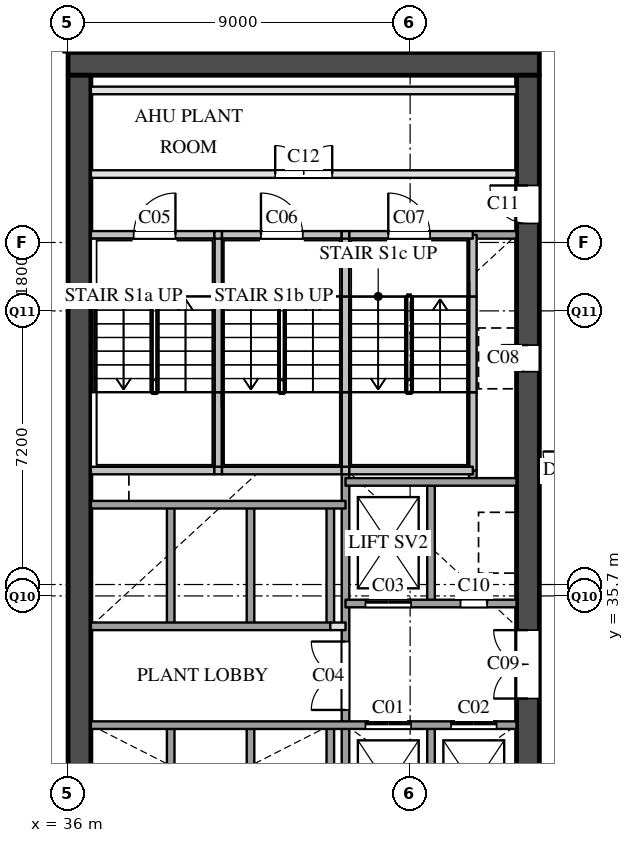
"""IFC4 building model, lengths in metres.
Left out: names, types, materials, properties, quantities, classifications, styles, units other than length and angle.
Written with IfcOpenShell. Run it as: python <this file> out.ifc"""

import sys

from ifc_helpers import new_model, si_unit, direction, frame, frame_2d, origin, place, context, subcontext, project, spatial, rectangle, extrude, element, fill, save


model = new_model("IFC4")
c1 = context("Model", 3, precision=1e-05, world=origin(), true_north=direction((0.0, 1.0)))
c2 = subcontext(c1, "Body", "Model", "MODEL_VIEW")
j1 = project(units=[si_unit("LENGTHUNIT", "METRE"), si_unit("PLANEANGLEUNIT", "RADIAN")], contexts=[c1])
p1 = place(None, origin())
s1 = spatial("IfcSite", under=j1, at=p1, CompositionType="ELEMENT")
p2 = place(p1, origin())
s2 = spatial("IfcBuilding", under=s1, at=p2, CompositionType="ELEMENT")
p3 = place(p2, frame((0.0, 0.0, 26.0)))
s3 = spatial("IfcBuildingStorey", under=s2, at=p3, CompositionType="ELEMENT", Elevation=26.0)
p4 = place(p3, frame((36.0, 49.7, 0.0), z_axis=(0.0, 0.0, 1.0), x_axis=(1.0, 0.0, 0.0)))
e1 = element("IfcWall", 1, at=p4, inside=s3, PredefinedType="SHEAR", context=c2, shape_type="SweptSolid", body=[
    extrude(rectangle(XDim=12.4, YDim=0.6, at=frame_2d((6.2, 0.0))), origin(), (0.0, 0.0, 1.0), 4.7),
])
p5 = place(p3, frame((36.3, 29.1, 0.0), z_axis=(0.0, 0.0, 1.0), x_axis=(0.0, 1.0, 0.0)))
e2 = element("IfcWall", 2, at=p5, inside=s3, PredefinedType="SHEAR", context=c2, shape_type="SweptSolid", body=[
    extrude(rectangle(XDim=20.3, YDim=0.6, at=frame_2d((10.15, 0.0))), origin(), (0.0, 0.0, 1.0), 4.7),
])
p6 = place(p3, frame((48.1, 29.1, 0.0), z_axis=(0.0, 0.0, 1.0), x_axis=(0.0, 1.0, 0.0)))
e3 = element("IfcWall", 3, at=p6, inside=s3, PredefinedType="SHEAR", context=c2, shape_type="SweptSolid", body=[
    extrude(rectangle(XDim=20.3, YDim=0.6, at=frame_2d((10.15, 0.0))), origin(), (0.0, 0.0, 1.0), 4.7),
])
p7 = place(p6, frame((12.5, 0.0, 0.0)))
e4 = element("IfcOpeningElement", 4, at=p7, cuts=e3, PredefinedType="OPENING", context=c2, shape_type="SweptSolid", body=[
    extrude(rectangle(XDim=0.7, YDim=2.1, at=frame_2d((0.35, 1.05))), frame((0.0, 0.31, 0.0), z_axis=(0.0, -1.0, 0.0), x_axis=(1.0, 0.0, 0.0)), (0.0, 0.0, 1.0), 0.62),
])
p8 = place(p6, frame((3.9, 0.0, 0.0)))
e5 = element("IfcOpeningElement", 5, at=p8, cuts=e3, PredefinedType="OPENING", context=c2, shape_type="SweptSolid", body=[
    extrude(rectangle(XDim=1.8, YDim=2.1, at=frame_2d((0.9, 1.05))), frame((0.0, 0.31, 0.0), z_axis=(0.0, -1.0, 0.0), x_axis=(1.0, 0.0, 0.0)), (0.0, 0.0, 1.0), 0.62),
])
p9 = place(p6, frame((16.4, 0.0, 0.0)))
e6 = element("IfcOpeningElement", 6, at=p9, cuts=e3, PredefinedType="OPENING", context=c2, shape_type="SweptSolid", body=[
    extrude(rectangle(XDim=1.0, YDim=2.1, at=frame_2d((0.5, 1.05))), frame((0.0, 0.31, 0.0), z_axis=(0.0, -1.0, 0.0), x_axis=(1.0, 0.0, 0.0)), (0.0, 0.0, 1.0), 0.62),
])
p10 = place(p3, frame((38.7, 29.1, 0.0), z_axis=(0.0, 0.0, 1.0), x_axis=(0.0, 1.0, 0.0)))
e7 = element("IfcWall", 7, at=p10, inside=s3, PredefinedType="SOLIDWALL", context=c2, shape_type="SweptSolid", body=[
    extrude(rectangle(XDim=3.2, YDim=0.2, at=frame_2d((1.6, 0.0))), origin(), (0.0, 0.0, 1.0), 4.7),
])
p11 = place(p3, frame((38.7, 34.9, 0.0), z_axis=(0.0, 0.0, 1.0), x_axis=(0.0, 1.0, 0.0)))
e8 = element("IfcWall", 8, at=p11, inside=s3, PredefinedType="SOLIDWALL", context=c2, shape_type="SweptSolid", body=[
    extrude(rectangle(XDim=3.2, YDim=0.2, at=frame_2d((1.6, 0.0))), origin(), (0.0, 0.0, 1.0), 4.7),
])
p12 = place(p3, frame((39.95, 39.0, 0.0), z_axis=(0.0, 0.0, 1.0), x_axis=(0.0, 1.0, 0.0)))
e9 = element("IfcWall", 9, at=p12, inside=s3, PredefinedType="SOLIDWALL", context=c2, shape_type="SweptSolid", body=[
    extrude(rectangle(XDim=2.06, YDim=0.2, at=frame_2d((1.03, 0.0))), origin(), (0.0, 0.0, 1.0), 4.7),
])
p13 = place(p3, frame((39.95, 41.06, 0.0), z_axis=(0.0, 0.0, 1.0), x_axis=(0.0, 1.0, 0.0)))
e10 = element("IfcWall", 10, at=p13, inside=s3, PredefinedType="SOLIDWALL", context=c2, shape_type="SweptSolid", body=[
    extrude(rectangle(XDim=2.52, YDim=0.2, at=frame_2d((1.26, 0.0))), origin(), (0.0, 0.0, 1.0), 4.7),
])
p14 = place(p3, frame((39.95, 43.58, 0.0), z_axis=(0.0, 0.0, 1.0), x_axis=(0.0, 1.0, 0.0)))
e11 = element("IfcWall", 11, at=p14, inside=s3, PredefinedType="SOLIDWALL", context=c2, shape_type="SweptSolid", body=[
    extrude(rectangle(XDim=1.62, YDim=0.2, at=frame_2d((0.81, 0.0))), origin(), (0.0, 0.0, 1.0), 4.7),
])
p15 = place(p3, frame((40.8, 29.1, 0.0), z_axis=(0.0, 0.0, 1.0), x_axis=(0.0, 1.0, 0.0)))
e12 = element("IfcWall", 12, at=p15, inside=s3, PredefinedType="SOLIDWALL", context=c2, shape_type="SweptSolid", body=[
    extrude(rectangle(XDim=3.2, YDim=0.2, at=frame_2d((1.6, 0.0))), origin(), (0.0, 0.0, 1.0), 4.7),
])
p16 = place(p3, frame((40.8, 34.9, 0.0), z_axis=(0.0, 0.0, 1.0), x_axis=(0.0, 1.0, 0.0)))
e13 = element("IfcWall", 13, at=p16, inside=s3, PredefinedType="SOLIDWALL", context=c2, shape_type="SweptSolid", body=[
    extrude(rectangle(XDim=3.2, YDim=0.2, at=frame_2d((1.6, 0.0))), origin(), (0.0, 0.0, 1.0), 4.7),
])
p17 = place(p3, frame((42.9, 29.1, 0.0), z_axis=(0.0, 0.0, 1.0), x_axis=(0.0, 1.0, 0.0)))
e14 = element("IfcWall", 14, at=p17, inside=s3, PredefinedType="SOLIDWALL", context=c2, shape_type="SweptSolid", body=[
    extrude(rectangle(XDim=3.2, YDim=0.2, at=frame_2d((1.6, 0.0))), origin(), (0.0, 0.0, 1.0), 4.7),
])
p18 = place(p3, frame((42.9, 34.9, 0.0), z_axis=(0.0, 0.0, 1.0), x_axis=(0.0, 1.0, 0.0)))
e15 = element("IfcWall", 15, at=p18, inside=s3, PredefinedType="SOLIDWALL", context=c2, shape_type="SweptSolid", body=[
    extrude(rectangle(XDim=3.2, YDim=0.2, at=frame_2d((1.6, 0.0))), origin(), (0.0, 0.0, 1.0), 4.7),
])
p19 = place(p3, frame((43.3, 29.1, 0.0), z_axis=(0.0, 0.0, 1.0), x_axis=(0.0, 1.0, 0.0)))
e16 = element("IfcWall", 16, at=p19, inside=s3, PredefinedType="SOLIDWALL", context=c2, shape_type="SweptSolid", body=[
    extrude(rectangle(XDim=9.9, YDim=0.2, at=frame_2d((4.95, 0.0))), origin(), (0.0, 0.0, 1.0), 4.7),
])
p20 = place(p19, frame((3.6, 0.0, 0.0)))
e17 = element("IfcOpeningElement", 17, at=p20, cuts=e16, PredefinedType="OPENING", context=c2, shape_type="SweptSolid", body=[
    extrude(rectangle(XDim=1.8, YDim=2.1, at=frame_2d((0.9, 1.05))), frame((0.0, 0.11, 0.0), z_axis=(0.0, -1.0, 0.0), x_axis=(1.0, 0.0, 0.0)), (0.0, 0.0, 1.0), 0.22),
])
p21 = place(p3, frame((43.3, 39.0, 0.0), z_axis=(0.0, 0.0, 1.0), x_axis=(0.0, 1.0, 0.0)))
e18 = element("IfcWall", 18, at=p21, inside=s3, PredefinedType="SOLIDWALL", context=c2, shape_type="SweptSolid", body=[
    extrude(rectangle(XDim=2.06, YDim=0.2, at=frame_2d((1.03, 0.0))), origin(), (0.0, 0.0, 1.0), 4.7),
])
p22 = place(p3, frame((43.3, 41.06, 0.0), z_axis=(0.0, 0.0, 1.0), x_axis=(0.0, 1.0, 0.0)))
e19 = element("IfcWall", 19, at=p22, inside=s3, PredefinedType="SOLIDWALL", context=c2, shape_type="SweptSolid", body=[
    extrude(rectangle(XDim=2.52, YDim=0.2, at=frame_2d((1.26, 0.0))), origin(), (0.0, 0.0, 1.0), 4.7),
])
p23 = place(p3, frame((43.3, 43.58, 0.0), z_axis=(0.0, 0.0, 1.0), x_axis=(0.0, 1.0, 0.0)))
e20 = element("IfcWall", 20, at=p23, inside=s3, PredefinedType="SOLIDWALL", context=c2, shape_type="SweptSolid", body=[
    extrude(rectangle(XDim=1.62, YDim=0.2, at=frame_2d((0.81, 0.0))), origin(), (0.0, 0.0, 1.0), 4.7),
])
for number, where, z_axis, x_axis in (
    (21, (45.55, 29.1, 0.0), (0.0, 0.0, 1.0), (0.0, 1.0, 0.0)),
    (22, (45.55, 35.5, 0.0), (0.0, 0.0, 1.0), (0.0, 1.0, 0.0)),
):
    element("IfcWall", number, at=place(p3, frame(where, z_axis=z_axis, x_axis=x_axis)), inside=s3, PredefinedType="SOLIDWALL", context=c2, shape_type="SweptSolid", body=[
        extrude(rectangle(XDim=3.2, YDim=0.2, at=frame_2d((1.6, 0.0))), origin(), (0.0, 0.0, 1.0), 4.7),
    ])
p24 = place(p3, frame((46.65, 38.7, 0.0), z_axis=(0.0, 0.0, 1.0), x_axis=(0.0, 1.0, 0.0)))
e23 = element("IfcWall", 23, at=p24, inside=s3, PredefinedType="SOLIDWALL", context=c2, shape_type="SweptSolid", body=[
    extrude(rectangle(XDim=0.3, YDim=0.2, at=frame_2d((0.15, 0.0))), origin(), (0.0, 0.0, 1.0), 4.7),
])
p25 = place(p3, frame((46.65, 39.0, 0.0), z_axis=(0.0, 0.0, 1.0), x_axis=(0.0, 1.0, 0.0)))
e24 = element("IfcWall", 24, at=p25, inside=s3, PredefinedType="SOLIDWALL", context=c2, shape_type="SweptSolid", body=[
    extrude(rectangle(XDim=2.06, YDim=0.2, at=frame_2d((1.03, 0.0))), origin(), (0.0, 0.0, 1.0), 4.7),
])
p26 = place(p3, frame((46.65, 41.06, 0.0), z_axis=(0.0, 0.0, 1.0), x_axis=(0.0, 1.0, 0.0)))
e25 = element("IfcWall", 25, at=p26, inside=s3, PredefinedType="SOLIDWALL", context=c2, shape_type="SweptSolid", body=[
    extrude(rectangle(XDim=2.52, YDim=0.2, at=frame_2d((1.26, 0.0))), origin(), (0.0, 0.0, 1.0), 4.7),
])
p27 = place(p3, frame((46.65, 43.58, 0.0), z_axis=(0.0, 0.0, 1.0), x_axis=(0.0, 1.0, 0.0)))
e26 = element("IfcWall", 26, at=p27, inside=s3, PredefinedType="SOLIDWALL", context=c2, shape_type="SweptSolid", body=[
    extrude(rectangle(XDim=1.62, YDim=0.2, at=frame_2d((0.81, 0.0))), origin(), (0.0, 0.0, 1.0), 4.7),
])
p28 = place(p3, frame((36.6, 32.3, 0.0), z_axis=(0.0, 0.0, 1.0), x_axis=(1.0, 0.0, 0.0)))
e27 = element("IfcWall", 27, at=p28, inside=s3, PredefinedType="SOLIDWALL", context=c2, shape_type="SweptSolid", body=[
    extrude(rectangle(XDim=11.2, YDim=0.2, at=frame_2d((5.6, 0.0))), origin(), (0.0, 0.0, 1.0), 4.7),
])
p29 = place(p28, frame((7.225, 0.0, 0.0)))
e28 = element("IfcOpeningElement", 28, at=p29, cuts=e27, PredefinedType="OPENING", context=c2, shape_type="SweptSolid", body=[
    extrude(rectangle(XDim=1.2, YDim=2.1, at=frame_2d((0.6, 1.05))), frame((0.0, 0.11, 0.0), z_axis=(0.0, -1.0, 0.0), x_axis=(1.0, 0.0, 0.0)), (0.0, 0.0, 1.0), 0.22),
])
p30 = place(p28, frame((9.475, 0.0, 0.0)))
e29 = element("IfcOpeningElement", 29, at=p30, cuts=e27, PredefinedType="OPENING", context=c2, shape_type="SweptSolid", body=[
    extrude(rectangle(XDim=1.2, YDim=2.1, at=frame_2d((0.6, 1.05))), frame((0.0, 0.11, 0.0), z_axis=(0.0, -1.0, 0.0), x_axis=(1.0, 0.0, 0.0)), (0.0, 0.0, 1.0), 0.22),
])
p31 = place(p3, frame((42.9, 34.9, 0.0), z_axis=(0.0, 0.0, 1.0), x_axis=(1.0, 0.0, 0.0)))
e30 = element("IfcWall", 30, at=p31, inside=s3, PredefinedType="PARTITIONING", context=c2, shape_type="SweptSolid", body=[
    extrude(rectangle(XDim=0.4, YDim=0.2, at=frame_2d((0.2, 0.0))), origin(), (0.0, 0.0, 1.0), 4.7),
])
p32 = place(p3, frame((36.6, 34.9, 0.0), z_axis=(0.0, 0.0, 1.0), x_axis=(1.0, 0.0, 0.0)))
e31 = element("IfcWall", 31, at=p32, inside=s3, PredefinedType="SOLIDWALL", context=c2, shape_type="SweptSolid", body=[
    extrude(rectangle(XDim=6.3, YDim=0.2, at=frame_2d((3.15, 0.0))), origin(), (0.0, 0.0, 1.0), 4.7),
])
p33 = place(p3, frame((43.3, 35.5, 0.0), z_axis=(0.0, 0.0, 1.0), x_axis=(1.0, 0.0, 0.0)))
e32 = element("IfcWall", 32, at=p33, inside=s3, PredefinedType="SOLIDWALL", context=c2, shape_type="SweptSolid", body=[
    extrude(rectangle(XDim=4.5, YDim=0.2, at=frame_2d((2.25, 0.0))), origin(), (0.0, 0.0, 1.0), 4.7),
])
p34 = place(p33, frame((0.525, 0.0, 0.0)))
e33 = element("IfcOpeningElement", 33, at=p34, cuts=e32, PredefinedType="OPENING", context=c2, shape_type="SweptSolid", body=[
    extrude(rectangle(XDim=1.2, YDim=2.1, at=frame_2d((0.6, 1.05))), frame((0.0, 0.11, 0.0), z_axis=(0.0, -1.0, 0.0), x_axis=(1.0, 0.0, 0.0)), (0.0, 0.0, 1.0), 0.22),
])
p35 = place(p33, frame((3.025, 0.0, 0.0)))
e34 = element("IfcOpeningElement", 34, at=p35, cuts=e32, PredefinedType="OPENING", context=c2, shape_type="SweptSolid", body=[
    extrude(rectangle(XDim=0.7, YDim=2.1, at=frame_2d((0.35, 1.05))), frame((0.0, 0.11, 0.0), z_axis=(0.0, -1.0, 0.0), x_axis=(1.0, 0.0, 0.0)), (0.0, 0.0, 1.0), 0.22),
])
p36 = place(p3, frame((36.6, 38.1, 0.0), z_axis=(0.0, 0.0, 1.0), x_axis=(1.0, 0.0, 0.0)))
e35 = element("IfcWall", 35, at=p36, inside=s3, PredefinedType="SOLIDWALL", context=c2, shape_type="SweptSolid", body=[
    extrude(rectangle(XDim=6.7, YDim=0.2, at=frame_2d((3.35, 0.0))), origin(), (0.0, 0.0, 1.0), 4.7),
])
p37 = place(p3, frame((43.3, 38.7, 0.0), z_axis=(0.0, 0.0, 1.0), x_axis=(1.0, 0.0, 0.0)))
e36 = element("IfcWall", 36, at=p37, inside=s3, PredefinedType="SOLIDWALL", context=c2, shape_type="SweptSolid", body=[
    extrude(rectangle(XDim=4.5, YDim=0.2, at=frame_2d((2.25, 0.0))), origin(), (0.0, 0.0, 1.0), 4.7),
])
p38 = place(p3, frame((36.6, 39.0, 0.0), z_axis=(0.0, 0.0, 1.0), x_axis=(1.0, 0.0, 0.0)))
e37 = element("IfcWall", 37, at=p38, inside=s3, PredefinedType="SOLIDWALL", context=c2, shape_type="SweptSolid", body=[
    extrude(rectangle(XDim=3.25, YDim=0.2, at=frame_2d((1.625, 0.0))), origin(), (0.0, 0.0, 1.0), 4.7),
])
p39 = place(p3, frame((39.85, 39.0, 0.0), z_axis=(0.0, 0.0, 1.0), x_axis=(1.0, 0.0, 0.0)))
e38 = element("IfcWall", 38, at=p39, inside=s3, PredefinedType="SOLIDWALL", context=c2, shape_type="SweptSolid", body=[
    extrude(rectangle(XDim=0.2, YDim=0.2, at=frame_2d((0.1, 0.0))), origin(), (0.0, 0.0, 1.0), 4.7),
])
p40 = place(p3, frame((40.05, 39.0, 0.0), z_axis=(0.0, 0.0, 1.0), x_axis=(1.0, 0.0, 0.0)))
e39 = element("IfcWall", 39, at=p40, inside=s3, PredefinedType="SOLIDWALL", context=c2, shape_type="SweptSolid", body=[
    extrude(rectangle(XDim=3.15, YDim=0.2, at=frame_2d((1.575, 0.0))), origin(), (0.0, 0.0, 1.0), 4.7),
])
p41 = place(p3, frame((43.2, 39.0, 0.0), z_axis=(0.0, 0.0, 1.0), x_axis=(1.0, 0.0, 0.0)))
e40 = element("IfcWall", 40, at=p41, inside=s3, PredefinedType="SOLIDWALL", context=c2, shape_type="SweptSolid", body=[
    extrude(rectangle(XDim=0.2, YDim=0.2, at=frame_2d((0.1, 0.0))), origin(), (0.0, 0.0, 1.0), 4.7),
])
p42 = place(p3, frame((43.4, 39.0, 0.0), z_axis=(0.0, 0.0, 1.0), x_axis=(1.0, 0.0, 0.0)))
e41 = element("IfcWall", 41, at=p42, inside=s3, PredefinedType="SOLIDWALL", context=c2, shape_type="SweptSolid", body=[
    extrude(rectangle(XDim=3.25, YDim=0.2, at=frame_2d((1.625, 0.0))), origin(), (0.0, 0.0, 1.0), 4.7),
])
p43 = place(p3, frame((46.65, 45.2, 0.0), z_axis=(0.0, 0.0, 1.0), x_axis=(1.0, 0.0, 0.0)))
e42 = element("IfcWall", 42, at=p43, inside=s3, PredefinedType="SOLIDWALL", context=c2, shape_type="SweptSolid", body=[
    extrude(rectangle(XDim=1.15, YDim=0.2, at=frame_2d((0.575, 0.0))), origin(), (0.0, 0.0, 1.0), 4.7),
])
p44 = place(p3, frame((36.6, 45.2, 0.0), z_axis=(0.0, 0.0, 1.0), x_axis=(1.0, 0.0, 0.0)))
e43 = element("IfcWall", 43, at=p44, inside=s3, PredefinedType="SOLIDWALL", context=c2, shape_type="SweptSolid", body=[
    extrude(rectangle(XDim=3.25, YDim=0.2, at=frame_2d((1.625, 0.0))), origin(), (0.0, 0.0, 1.0), 4.7),
])
p45 = place(p44, frame((1.125, 0.0, 0.0)))
e44 = element("IfcOpeningElement", 44, at=p45, cuts=e43, PredefinedType="OPENING", context=c2, shape_type="SweptSolid", body=[
    extrude(rectangle(XDim=1.1, YDim=2.1, at=frame_2d((0.55, 1.05))), frame((0.0, 0.11, 0.0), z_axis=(0.0, -1.0, 0.0), x_axis=(1.0, 0.0, 0.0)), (0.0, 0.0, 1.0), 0.22),
])
p46 = place(p3, frame((39.85, 45.2, 0.0), z_axis=(0.0, 0.0, 1.0), x_axis=(1.0, 0.0, 0.0)))
e45 = element("IfcWall", 45, at=p46, inside=s3, PredefinedType="SOLIDWALL", context=c2, shape_type="SweptSolid", body=[
    extrude(rectangle(XDim=0.2, YDim=0.2, at=frame_2d((0.1, 0.0))), origin(), (0.0, 0.0, 1.0), 4.7),
])
p47 = place(p3, frame((40.05, 45.2, 0.0), z_axis=(0.0, 0.0, 1.0), x_axis=(1.0, 0.0, 0.0)))
e46 = element("IfcWall", 46, at=p47, inside=s3, PredefinedType="SOLIDWALL", context=c2, shape_type="SweptSolid", body=[
    extrude(rectangle(XDim=3.15, YDim=0.2, at=frame_2d((1.575, 0.0))), origin(), (0.0, 0.0, 1.0), 4.7),
])
p48 = place(p47, frame((1.025, 0.0, 0.0)))
e47 = element("IfcOpeningElement", 47, at=p48, cuts=e46, PredefinedType="OPENING", context=c2, shape_type="SweptSolid", body=[
    extrude(rectangle(XDim=1.1, YDim=2.1, at=frame_2d((0.55, 1.05))), frame((0.0, 0.11, 0.0), z_axis=(0.0, -1.0, 0.0), x_axis=(1.0, 0.0, 0.0)), (0.0, 0.0, 1.0), 0.22),
])
p49 = place(p3, frame((43.2, 45.2, 0.0), z_axis=(0.0, 0.0, 1.0), x_axis=(1.0, 0.0, 0.0)))
e48 = element("IfcWall", 48, at=p49, inside=s3, PredefinedType="SOLIDWALL", context=c2, shape_type="SweptSolid", body=[
    extrude(rectangle(XDim=0.2, YDim=0.2, at=frame_2d((0.1, 0.0))), origin(), (0.0, 0.0, 1.0), 4.7),
])
p50 = place(p3, frame((43.4, 45.2, 0.0), z_axis=(0.0, 0.0, 1.0), x_axis=(1.0, 0.0, 0.0)))
e49 = element("IfcWall", 49, at=p50, inside=s3, PredefinedType="SOLIDWALL", context=c2, shape_type="SweptSolid", body=[
    extrude(rectangle(XDim=3.25, YDim=0.2, at=frame_2d((1.625, 0.0))), origin(), (0.0, 0.0, 1.0), 4.7),
])
p51 = place(p50, frame((1.025, 0.0, 0.0)))
e50 = element("IfcOpeningElement", 50, at=p51, cuts=e49, PredefinedType="OPENING", context=c2, shape_type="SweptSolid", body=[
    extrude(rectangle(XDim=1.1, YDim=2.1, at=frame_2d((0.55, 1.05))), frame((0.0, 0.11, 0.0), z_axis=(0.0, -1.0, 0.0), x_axis=(1.0, 0.0, 0.0)), (0.0, 0.0, 1.0), 0.22),
])
p52 = place(p3, frame((36.6, 46.8, 0.0), z_axis=(0.0, 0.0, 1.0), x_axis=(1.0, 0.0, 0.0)))
e51 = element("IfcWall", 51, at=p52, inside=s3, PredefinedType="PARTITIONING", context=c2, shape_type="SweptSolid", body=[
    extrude(rectangle(XDim=11.2, YDim=0.2, at=frame_2d((5.6, 0.0))), origin(), (0.0, 0.0, 1.0), 4.7),
])
p53 = place(p52, frame((4.85, 0.0, 0.0)))
e52 = element("IfcOpeningElement", 52, at=p53, cuts=e51, PredefinedType="OPENING", context=c2, shape_type="SweptSolid", body=[
    extrude(rectangle(XDim=1.5, YDim=2.1, at=frame_2d((0.75, 1.05))), frame((0.0, 0.11, 0.0), z_axis=(0.0, -1.0, 0.0), x_axis=(1.0, 0.0, 0.0)), (0.0, 0.0, 1.0), 0.22),
])
p54 = place(p3, frame((36.6, 49.0, 0.0), z_axis=(0.0, 0.0, 1.0), x_axis=(1.0, 0.0, 0.0)))
e53 = element("IfcWall", 53, at=p54, inside=s3, PredefinedType="PARTITIONING", context=c2, shape_type="SweptSolid", body=[
    extrude(rectangle(XDim=11.2, YDim=0.2, at=frame_2d((5.6, 0.0))), origin(), (0.0, 0.0, 1.0), 4.7),
])
p55 = place(p29, origin())
e54 = element("IfcDoor", 54, at=p55, inside=s3, OperationType="SLIDING_TO_LEFT", PredefinedType="DOOR", context=c2, shape_type="SweptSolid", body=[
    extrude(rectangle(XDim=1.2, YDim=2.1, at=frame_2d((0.6, 1.05))), frame((0.0, 0.025, 0.0), z_axis=(0.0, -1.0, 0.0), x_axis=(1.0, 0.0, 0.0)), (0.0, 0.0, 1.0), 0.05),
])
fill(e28, e54)
p56 = place(p30, origin())
e55 = element("IfcDoor", 55, at=p56, inside=s3, OperationType="SLIDING_TO_LEFT", PredefinedType="DOOR", context=c2, shape_type="SweptSolid", body=[
    extrude(rectangle(XDim=1.2, YDim=2.1, at=frame_2d((0.6, 1.05))), frame((0.0, 0.025, 0.0), z_axis=(0.0, -1.0, 0.0), x_axis=(1.0, 0.0, 0.0)), (0.0, 0.0, 1.0), 0.05),
])
fill(e29, e55)
p57 = place(p34, origin())
e56 = element("IfcDoor", 56, at=p57, inside=s3, OperationType="SLIDING_TO_LEFT", PredefinedType="DOOR", context=c2, shape_type="SweptSolid", body=[
    extrude(rectangle(XDim=1.2, YDim=2.1, at=frame_2d((0.6, 1.05))), frame((0.0, 0.025, 0.0), z_axis=(0.0, -1.0, 0.0), x_axis=(1.0, 0.0, 0.0)), (0.0, 0.0, 1.0), 0.05),
])
fill(e33, e56)
p58 = place(p20, origin())
e57 = element("IfcDoor", 57, at=p58, inside=s3, OperationType="DOUBLE_DOOR_SINGLE_SWING", PredefinedType="DOOR", context=c2, shape_type="SweptSolid", body=[
    extrude(rectangle(XDim=1.8, YDim=2.1, at=frame_2d((0.9, 1.05))), frame((0.0, 0.025, 0.0), z_axis=(0.0, -1.0, 0.0), x_axis=(1.0, 0.0, 0.0)), (0.0, 0.0, 1.0), 0.05),
])
fill(e17, e57)
p59 = place(p45, origin())
e58 = element("IfcDoor", 58, at=p59, inside=s3, OperationType="SINGLE_SWING_RIGHT", PredefinedType="DOOR", context=c2, shape_type="SweptSolid", body=[
    extrude(rectangle(XDim=1.1, YDim=2.1, at=frame_2d((0.55, 1.05))), frame((0.0, 0.025, 0.0), z_axis=(0.0, -1.0, 0.0), x_axis=(1.0, 0.0, 0.0)), (0.0, 0.0, 1.0), 0.05),
])
fill(e44, e58)
p60 = place(p48, origin())
e59 = element("IfcDoor", 59, at=p60, inside=s3, OperationType="SINGLE_SWING_LEFT", PredefinedType="DOOR", context=c2, shape_type="SweptSolid", body=[
    extrude(rectangle(XDim=1.1, YDim=2.1, at=frame_2d((0.55, 1.05))), frame((0.0, 0.025, 0.0), z_axis=(0.0, -1.0, 0.0), x_axis=(1.0, 0.0, 0.0)), (0.0, 0.0, 1.0), 0.05),
])
fill(e47, e59)
p61 = place(p51, origin())
e60 = element("IfcDoor", 60, at=p61, inside=s3, OperationType="SINGLE_SWING_LEFT", PredefinedType="DOOR", context=c2, shape_type="SweptSolid", body=[
    extrude(rectangle(XDim=1.1, YDim=2.1, at=frame_2d((0.55, 1.05))), frame((0.0, 0.025, 0.0), z_axis=(0.0, -1.0, 0.0), x_axis=(1.0, 0.0, 0.0)), (0.0, 0.0, 1.0), 0.05),
])
fill(e50, e60)
p62 = place(p7, origin())
e61 = element("IfcDoor", 61, at=p62, inside=s3, OperationType="SINGLE_SWING_RIGHT", PredefinedType="DOOR", context=c2, shape_type="SweptSolid", body=[
    extrude(rectangle(XDim=0.7, YDim=2.1, at=frame_2d((0.35, 1.05))), frame((0.0, 0.025, 0.0), z_axis=(0.0, -1.0, 0.0), x_axis=(1.0, 0.0, 0.0)), (0.0, 0.0, 1.0), 0.05),
])
fill(e4, e61)
p63 = place(p8, origin())
e62 = element("IfcDoor", 62, at=p63, inside=s3, OperationType="DOUBLE_DOOR_SINGLE_SWING", PredefinedType="DOOR", context=c2, shape_type="SweptSolid", body=[
    extrude(rectangle(XDim=1.8, YDim=2.1, at=frame_2d((0.9, 1.05))), frame((0.0, 0.025, 0.0), z_axis=(0.0, -1.0, 0.0), x_axis=(1.0, 0.0, 0.0)), (0.0, 0.0, 1.0), 0.05),
])
fill(e5, e62)
p64 = place(p35, origin())
e63 = element("IfcDoor", 63, at=p64, inside=s3, OperationType="SINGLE_SWING_RIGHT", PredefinedType="DOOR", context=c2, shape_type="SweptSolid", body=[
    extrude(rectangle(XDim=0.7, YDim=2.1, at=frame_2d((0.35, 1.05))), frame((0.0, 0.025, 0.0), z_axis=(0.0, -1.0, 0.0), x_axis=(1.0, 0.0, 0.0)), (0.0, 0.0, 1.0), 0.05),
])
fill(e34, e63)
p65 = place(p9, origin())
e64 = element("IfcDoor", 64, at=p65, inside=s3, OperationType="SINGLE_SWING_RIGHT", PredefinedType="DOOR", context=c2, shape_type="SweptSolid", body=[
    extrude(rectangle(XDim=1.0, YDim=2.1, at=frame_2d((0.5, 1.05))), frame((0.0, 0.025, 0.0), z_axis=(0.0, -1.0, 0.0), x_axis=(1.0, 0.0, 0.0)), (0.0, 0.0, 1.0), 0.05),
])
fill(e6, e64)
p66 = place(p53, origin())
e65 = element("IfcDoor", 65, at=p66, inside=s3, OperationType="DOUBLE_DOOR_SINGLE_SWING", PredefinedType="DOOR", context=c2, shape_type="SweptSolid", body=[
    extrude(rectangle(XDim=1.5, YDim=2.1, at=frame_2d((0.75, 1.05))), frame((0.0, 0.025, 0.0), z_axis=(0.0, -1.0, 0.0), x_axis=(1.0, 0.0, 0.0)), (0.0, 0.0, 1.0), 0.05),
])
fill(e52, e65)
save(model, sys.argv[1])
